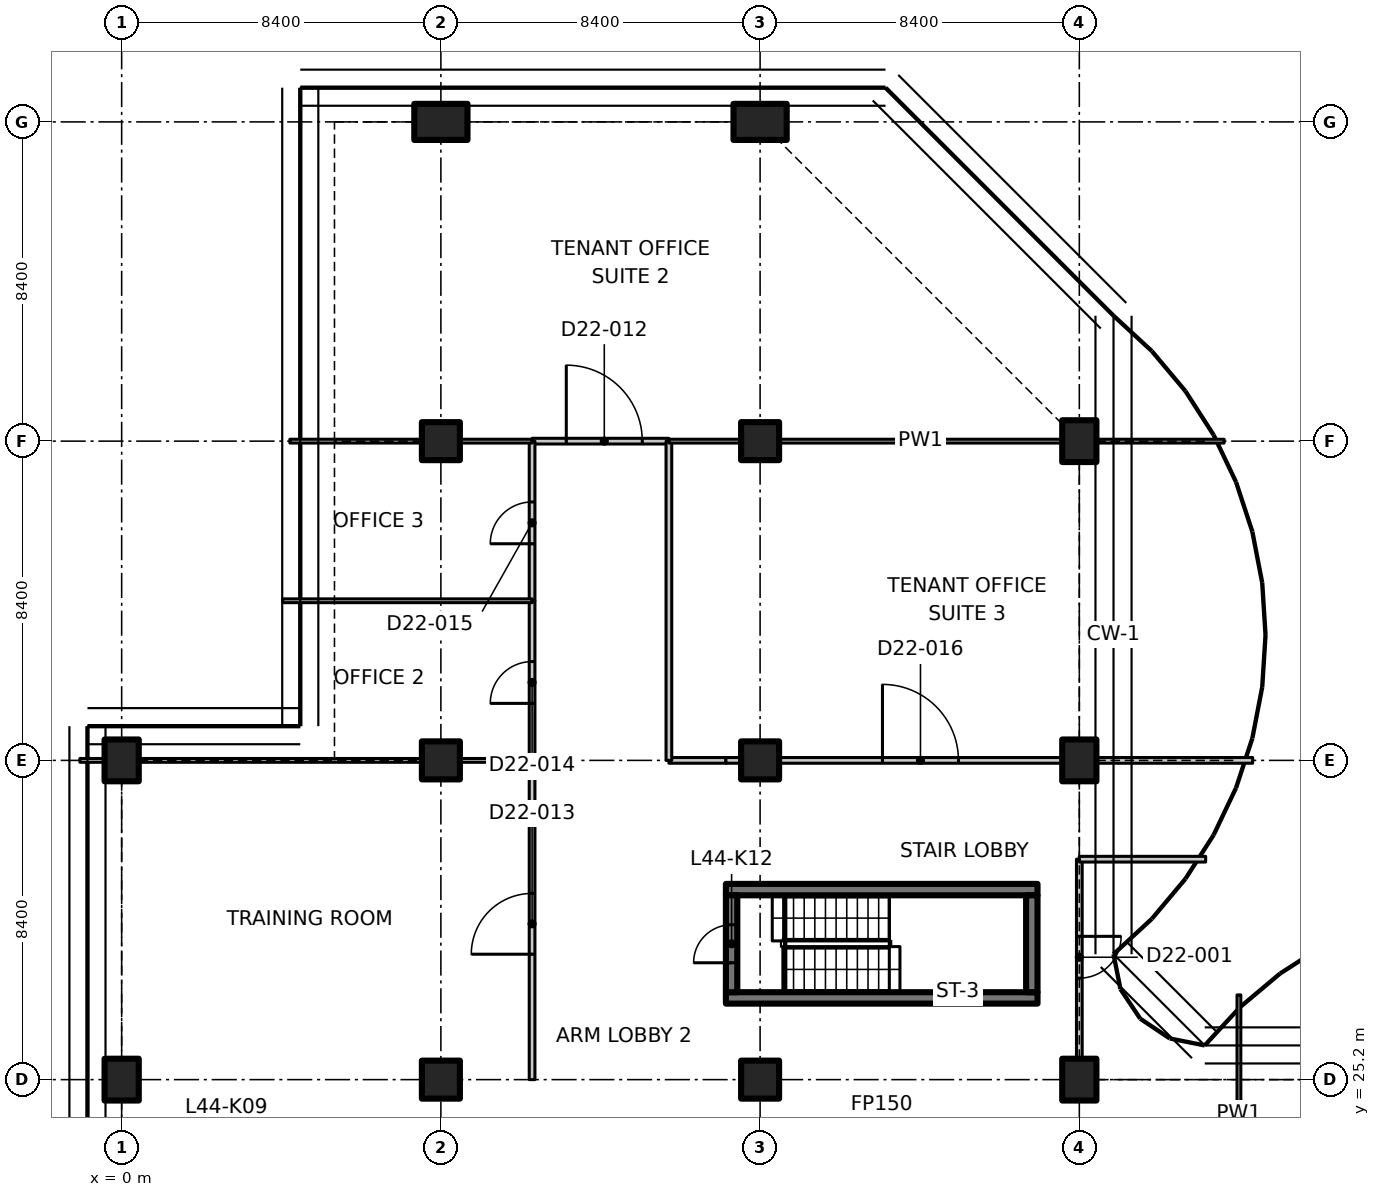
"""IFC4 building model, lengths in metres.
Left out: names, types, materials, properties, quantities, classifications, styles, units other than length and angle.
Written with IfcOpenShell. Run it as: python <this file> out.ifc"""

import sys

from ifc_helpers import new_model, si_unit, direction, frame, frame_2d, origin, origin_2d, place, context, subcontext, project, spatial, polyline, rectangle, outline, extrude, element, fill, save


model = new_model("IFC4")
c1 = context("Model", 3, precision=1e-05, world=origin(), true_north=direction((0.0, 1.0)))
c2 = subcontext(c1, "Body", "Model", "MODEL_VIEW")
j1 = project(units=[si_unit("LENGTHUNIT", "METRE"), si_unit("PLANEANGLEUNIT", "RADIAN")], contexts=[c1])
p1 = place(None, origin())
s1 = spatial("IfcSite", under=j1, at=p1, CompositionType="ELEMENT")
p2 = place(p1, origin())
s2 = spatial("IfcBuilding", under=s1, at=p2, CompositionType="ELEMENT")
p3 = place(p2, frame((0.0, 0.0, 177.6)))
s3 = spatial("IfcBuildingStorey", under=s2, at=p3, CompositionType="ELEMENT", Elevation=177.6)
for number, where, z_axis, x_axis in (
    (1, (0.0, 25.2, 0.0), (0.0, 0.0, 1.0), (1.0, 0.0, 0.0)),
    (2, (0.0, 33.6, 0.0), (0.0, 0.0, 1.0), (1.0, 0.0, 0.0)),
):
    element("IfcColumn", number, at=place(p3, frame(where, z_axis=z_axis, x_axis=x_axis)), inside=s3, PredefinedType="COLUMN", context=c2, shape_type="SweptSolid", body=[
        extrude(rectangle(XDim=0.9, YDim=1.1, at=origin_2d()), origin(), (0.0, 0.0, 1.0), 3.35),
    ])
for number, where, z_axis, x_axis in (
    (3, (8.4, 25.2, 0.0), (0.0, 0.0, 1.0), (1.0, 0.0, 0.0)),
    (4, (8.4, 33.6, 0.0), (0.0, 0.0, 1.0), (1.0, 0.0, 0.0)),
    (5, (8.4, 42.0, 0.0), (0.0, 0.0, 1.0), (1.0, 0.0, 0.0)),
):
    element("IfcColumn", number, at=place(p3, frame(where, z_axis=z_axis, x_axis=x_axis)), inside=s3, PredefinedType="COLUMN", context=c2, shape_type="SweptSolid", body=[
        extrude(rectangle(XDim=1.0, YDim=1.0, at=origin_2d()), origin(), (0.0, 0.0, 1.0), 3.35),
    ])
p4 = place(p3, frame((8.4, 50.4, 0.0), z_axis=(0.0, 0.0, 1.0), x_axis=(0.0, 1.0, 0.0)))
e6 = element("IfcColumn", 6, at=p4, inside=s3, PredefinedType="COLUMN", context=c2, shape_type="SweptSolid", body=[
    extrude(rectangle(XDim=0.95, YDim=1.4, at=origin_2d()), origin(), (0.0, 0.0, 1.0), 3.35),
])
for number, where, z_axis, x_axis in (
    (7, (16.8, 25.2, 0.0), (0.0, 0.0, 1.0), (1.0, 0.0, 0.0)),
    (8, (16.8, 33.6, 0.0), (0.0, 0.0, 1.0), (1.0, 0.0, 0.0)),
    (9, (16.8, 42.0, 0.0), (0.0, 0.0, 1.0), (1.0, 0.0, 0.0)),
):
    element("IfcColumn", number, at=place(p3, frame(where, z_axis=z_axis, x_axis=x_axis)), inside=s3, PredefinedType="COLUMN", context=c2, shape_type="SweptSolid", body=[
        extrude(rectangle(XDim=1.0, YDim=1.0, at=origin_2d()), origin(), (0.0, 0.0, 1.0), 3.35),
    ])
p5 = place(p3, frame((16.8, 50.4, 0.0), z_axis=(0.0, 0.0, 1.0), x_axis=(0.0, 1.0, 0.0)))
e10 = element("IfcColumn", 10, at=p5, inside=s3, PredefinedType="COLUMN", context=c2, shape_type="SweptSolid", body=[
    extrude(rectangle(XDim=0.95, YDim=1.4, at=origin_2d()), origin(), (0.0, 0.0, 1.0), 3.35),
])
for number, where, z_axis, x_axis in (
    (11, (25.2, 25.2, 0.0), (0.0, 0.0, 1.0), (1.0, 0.0, 0.0)),
    (12, (25.2, 33.6, 0.0), (0.0, 0.0, 1.0), (1.0, 0.0, 0.0)),
    (13, (25.2, 42.0, 0.0), (0.0, 0.0, 1.0), (1.0, 0.0, 0.0)),
):
    element("IfcColumn", number, at=place(p3, frame(where, z_axis=z_axis, x_axis=x_axis)), inside=s3, PredefinedType="COLUMN", context=c2, shape_type="SweptSolid", body=[
        extrude(rectangle(XDim=0.9, YDim=1.1, at=origin_2d()), origin(), (0.0, 0.0, 1.0), 3.35),
    ])
for number, where, z_axis, x_axis in (
    (14, (15.9, 27.35, 0.0), (0.0, 0.0, 1.0), (1.0, 0.0, 0.0)),
    (15, (15.9, 30.2, 0.0), (0.0, 0.0, 1.0), (1.0, 0.0, 0.0)),
):
    element("IfcWall", number, at=place(p3, frame(where, z_axis=z_axis, x_axis=x_axis)), inside=s3, PredefinedType="SHEAR", context=c2, shape_type="SweptSolid", body=[
        extrude(rectangle(XDim=8.2, YDim=0.3, at=frame_2d((4.1, 0.0))), origin(), (0.0, 0.0, 1.0), 3.35),
    ])
p6 = place(p3, frame((16.05, 27.5, 0.0), z_axis=(0.0, 0.0, 1.0), x_axis=(0.0, 1.0, 0.0)))
e16 = element("IfcWall", 16, at=p6, inside=s3, PredefinedType="SHEAR", context=c2, shape_type="SweptSolid", body=[
    extrude(rectangle(XDim=2.55, YDim=0.3, at=frame_2d((1.275, 0.0))), origin(), (0.0, 0.0, 1.0), 3.35),
])
p7 = place(p6, frame((0.775, 0.0, 0.0)))
e17 = element("IfcOpeningElement", 17, at=p7, cuts=e16, PredefinedType="OPENING", context=c2, shape_type="SweptSolid", body=[
    extrude(rectangle(XDim=1.0, YDim=2.1, at=frame_2d((0.5, 1.05))), frame((0.0, 0.16, 0.0), z_axis=(0.0, -1.0, 0.0), x_axis=(1.0, 0.0, 0.0)), (0.0, 0.0, 1.0), 0.32),
])
p8 = place(p3, frame((23.95, 27.5, 0.0), z_axis=(0.0, 0.0, 1.0), x_axis=(0.0, 1.0, 0.0)))
e18 = element("IfcWall", 18, at=p8, inside=s3, PredefinedType="SHEAR", context=c2, shape_type="SweptSolid", body=[
    extrude(rectangle(XDim=2.55, YDim=0.3, at=frame_2d((1.275, 0.0))), origin(), (0.0, 0.0, 1.0), 3.35),
])
p9 = place(p3, frame((29.4, 27.429, 0.0), z_axis=(0.0, 0.0, 1.0), x_axis=(0.0, -1.0, 0.0)))
e19 = element("IfcWall", 19, at=p9, inside=s3, PredefinedType="PARTITIONING", context=c2, shape_type="SweptSolid", body=[
    extrude(outline(polyline([(0.0, 0.0), (6.229, 0.0), (6.229, 3.33), (2.679, 3.33), (2.677, 2.98), (1.781, 2.98), (1.779, 3.33), (0.154, 3.33), (0.0, 3.33), (0.0, 0.0)])), frame((0.0, 0.05, 0.0), z_axis=(0.0, -1.0, 0.0), x_axis=(1.0, 0.0, 0.0)), (0.0, 0.0, 1.0), 0.1),
])
p10 = place(p3, frame((25.2, 31.0, 0.0), z_axis=(0.0, 0.0, 1.0), x_axis=(0.0, -1.0, 0.0)))
e20 = element("IfcWall", 20, at=p10, inside=s3, PredefinedType="PARTITIONING", context=c2, shape_type="SweptSolid", body=[
    extrude(outline(polyline([(0.0, 0.0), (5.23, 0.0), (5.23, 2.98), (0.0, 2.98), (0.0, 0.0)])), frame((0.0, 0.075, 0.0), z_axis=(0.0, -1.0, 0.0), x_axis=(1.0, 0.0, 0.0)), (0.0, 0.0, 1.0), 0.15),
])
p11 = place(p10, frame((2.03, 0.0, 0.0)))
e21 = element("IfcOpeningElement", 21, at=p11, cuts=e20, PredefinedType="OPENING", context=c2, shape_type="SweptSolid", body=[
    extrude(rectangle(XDim=1.1, YDim=2.1, at=frame_2d((0.55, 1.05))), frame((0.0, 0.085, 0.0), z_axis=(0.0, -1.0, 0.0), x_axis=(1.0, 0.0, 0.0)), (0.0, 0.0, 1.0), 0.17),
])
p12 = place(p3, frame((25.2, 31.0, 0.0), z_axis=(0.0, 0.0, 1.0), x_axis=(1.0, 0.0, 0.0)))
e22 = element("IfcWall", 22, at=p12, inside=s3, PredefinedType="PARTITIONING", context=c2, shape_type="SweptSolid", body=[
    extrude(rectangle(XDim=3.324, YDim=0.15, at=frame_2d((1.662, 0.0))), origin(), (0.0, 0.0, 1.0), 2.98),
])
p13 = place(p3, frame((10.8, 25.2, 0.0), z_axis=(0.0, 0.0, 1.0), x_axis=(0.0, 1.0, 0.0)))
e23 = element("IfcWall", 23, at=p13, inside=s3, PredefinedType="PARTITIONING", context=c2, shape_type="SweptSolid", body=[
    extrude(rectangle(XDim=8.4, YDim=0.15, at=frame_2d((4.2, 0.0))), origin(), (0.0, 0.0, 1.0), 3.33),
])
p14 = place(p13, frame((3.3, 0.0, 0.0)))
e24 = element("IfcOpeningElement", 24, at=p14, cuts=e23, PredefinedType="OPENING", context=c2, shape_type="SweptSolid", body=[
    extrude(rectangle(XDim=1.6, YDim=2.1, at=frame_2d((0.8, 1.05))), frame((0.0, 0.085, 0.0), z_axis=(0.0, -1.0, 0.0), x_axis=(1.0, 0.0, 0.0)), (0.0, 0.0, 1.0), 0.17),
])
p15 = place(p3, frame((14.4, 33.6, 0.0), z_axis=(0.0, 0.0, 1.0), x_axis=(1.0, 0.0, 0.0)))
e25 = element("IfcWall", 25, at=p15, inside=s3, PredefinedType="PARTITIONING", context=c2, shape_type="SweptSolid", body=[
    extrude(rectangle(XDim=1.5, YDim=0.15, at=frame_2d((0.75, 0.0))), origin(), (0.0, 0.0, 1.0), 3.33),
])
p16 = place(p3, frame((15.9, 33.6, 0.0), z_axis=(0.0, 0.0, 1.0), x_axis=(1.0, 0.0, 0.0)))
e26 = element("IfcWall", 26, at=p16, inside=s3, PredefinedType="PARTITIONING", context=c2, shape_type="SweptSolid", body=[
    extrude(rectangle(XDim=0.38, YDim=0.15, at=frame_2d((0.19, 0.0))), origin(), (0.0, 0.0, 1.0), 3.33),
])
p17 = place(p3, frame((17.32, 33.6, 0.0), z_axis=(0.0, 0.0, 1.0), x_axis=(1.0, 0.0, 0.0)))
e27 = element("IfcWall", 27, at=p17, inside=s3, PredefinedType="PARTITIONING", context=c2, shape_type="SweptSolid", body=[
    extrude(rectangle(XDim=7.41, YDim=0.15, at=frame_2d((3.705, 0.0))), origin(), (0.0, 0.0, 1.0), 3.33),
])
p18 = place(p17, frame((2.7, 0.0, 0.0)))
e28 = element("IfcOpeningElement", 28, at=p18, cuts=e27, PredefinedType="OPENING", context=c2, shape_type="SweptSolid", body=[
    extrude(rectangle(XDim=2.0, YDim=2.4, at=frame_2d((1.0, 1.2))), frame((0.0, 0.085, 0.0), z_axis=(0.0, -1.0, 0.0), x_axis=(1.0, 0.0, 0.0)), (0.0, 0.0, 1.0), 0.17),
])
p19 = place(p3, frame((25.67, 33.6, 0.0), z_axis=(0.0, 0.0, 1.0), x_axis=(1.0, 0.0, 0.0)))
e29 = element("IfcWall", 29, at=p19, inside=s3, PredefinedType="PARTITIONING", context=c2, shape_type="SweptSolid", body=[
    extrude(rectangle(XDim=4.092, YDim=0.15, at=frame_2d((2.046, 0.0))), origin(), (0.0, 0.0, 1.0), 2.98),
])
p20 = place(p3, frame((10.8, 42.0, 0.0), z_axis=(0.0, 0.0, 1.0), x_axis=(1.0, 0.0, 0.0)))
e30 = element("IfcWall", 30, at=p20, inside=s3, PredefinedType="PARTITIONING", context=c2, shape_type="SweptSolid", body=[
    extrude(rectangle(XDim=3.6, YDim=0.15, at=frame_2d((1.8, 0.0))), origin(), (0.0, 0.0, 1.0), 3.33),
])
p21 = place(p20, frame((0.9, 0.0, 0.0)))
e31 = element("IfcOpeningElement", 31, at=p21, cuts=e30, PredefinedType="OPENING", context=c2, shape_type="SweptSolid", body=[
    extrude(rectangle(XDim=2.0, YDim=2.4, at=frame_2d((1.0, 1.2))), frame((0.0, 0.085, 0.0), z_axis=(0.0, -1.0, 0.0), x_axis=(1.0, 0.0, 0.0)), (0.0, 0.0, 1.0), 0.17),
])
p22 = place(p3, frame((10.8, 33.6, 0.0), z_axis=(0.0, 0.0, 1.0), x_axis=(0.0, 1.0, 0.0)))
e32 = element("IfcWall", 32, at=p22, inside=s3, PredefinedType="PARTITIONING", context=c2, shape_type="SweptSolid", body=[
    extrude(rectangle(XDim=4.2, YDim=0.15, at=frame_2d((2.1, 0.0))), origin(), (0.0, 0.0, 1.0), 3.33),
])
p23 = place(p22, frame((1.5, 0.0, 0.0)))
e33 = element("IfcOpeningElement", 33, at=p23, cuts=e32, PredefinedType="OPENING", context=c2, shape_type="SweptSolid", body=[
    extrude(rectangle(XDim=1.1, YDim=2.1, at=frame_2d((0.55, 1.05))), frame((0.0, 0.085, 0.0), z_axis=(0.0, -1.0, 0.0), x_axis=(1.0, 0.0, 0.0)), (0.0, 0.0, 1.0), 0.17),
])
p24 = place(p3, frame((10.8, 37.8, 0.0), z_axis=(0.0, 0.0, 1.0), x_axis=(0.0, 1.0, 0.0)))
e34 = element("IfcWall", 34, at=p24, inside=s3, PredefinedType="PARTITIONING", context=c2, shape_type="SweptSolid", body=[
    extrude(rectangle(XDim=4.2, YDim=0.15, at=frame_2d((2.1, 0.0))), origin(), (0.0, 0.0, 1.0), 3.33),
])
p25 = place(p24, frame((1.5, 0.0, 0.0)))
e35 = element("IfcOpeningElement", 35, at=p25, cuts=e34, PredefinedType="OPENING", context=c2, shape_type="SweptSolid", body=[
    extrude(rectangle(XDim=1.1, YDim=2.1, at=frame_2d((0.55, 1.05))), frame((0.0, 0.085, 0.0), z_axis=(0.0, -1.0, 0.0), x_axis=(1.0, 0.0, 0.0)), (0.0, 0.0, 1.0), 0.17),
])
p26 = place(p3, frame((14.4, 42.0, 0.0), z_axis=(0.0, 0.0, 1.0), x_axis=(0.0, -1.0, 0.0)))
e36 = element("IfcWall", 36, at=p26, inside=s3, PredefinedType="PARTITIONING", context=c2, shape_type="SweptSolid", body=[
    extrude(rectangle(XDim=8.4, YDim=0.15, at=frame_2d((4.2, 0.0))), origin(), (0.0, 0.0, 1.0), 3.33),
])
p27 = place(p3, frame((10.8, 42.0, 0.0), z_axis=(0.0, 0.0, 1.0), x_axis=(-1.0, 0.0, 0.0)))
e37 = element("IfcWall", 37, at=p27, inside=s3, PredefinedType="PARTITIONING", context=c2, shape_type="SweptSolid", body=[
    extrude(rectangle(XDim=1.88, YDim=0.1, at=frame_2d((0.94, 0.0))), origin(), (0.0, 0.0, 1.0), 3.33),
])
p28 = place(p3, frame((7.88, 42.0, 0.0), z_axis=(0.0, 0.0, 1.0), x_axis=(-1.0, 0.0, 0.0)))
e38 = element("IfcWall", 38, at=p28, inside=s3, PredefinedType="PARTITIONING", context=c2, shape_type="SweptSolid", body=[
    extrude(rectangle(XDim=3.454, YDim=0.1, at=frame_2d((1.727, 0.0))), origin(), (0.0, 0.0, 1.0), 2.98),
])
p29 = place(p3, frame((29.011, 42.0, 0.0), z_axis=(0.0, 0.0, 1.0), x_axis=(-1.0, 0.0, 0.0)))
e39 = element("IfcWall", 39, at=p29, inside=s3, PredefinedType="PARTITIONING", context=c2, shape_type="SweptSolid", body=[
    extrude(rectangle(XDim=3.342, YDim=0.1, at=frame_2d((1.671, 0.0))), origin(), (0.0, 0.0, 1.0), 2.98),
])
p30 = place(p3, frame((24.73, 42.0, 0.0), z_axis=(0.0, 0.0, 1.0), x_axis=(-1.0, 0.0, 0.0)))
e40 = element("IfcWall", 40, at=p30, inside=s3, PredefinedType="PARTITIONING", context=c2, shape_type="SweptSolid", body=[
    extrude(outline(polyline([(0.0, 0.0), (7.41, 0.0), (7.41, 3.33), (0.196, 3.33), (0.194, 2.98), (0.0, 2.98), (0.0, 0.0)])), frame((0.0, 0.05, 0.0), z_axis=(0.0, -1.0, 0.0), x_axis=(1.0, 0.0, 0.0)), (0.0, 0.0, 1.0), 0.1),
])
p31 = place(p3, frame((16.28, 42.0, 0.0), z_axis=(0.0, 0.0, 1.0), x_axis=(-1.0, 0.0, 0.0)))
e41 = element("IfcWall", 41, at=p31, inside=s3, PredefinedType="PARTITIONING", context=c2, shape_type="SweptSolid", body=[
    extrude(rectangle(XDim=1.88, YDim=0.1, at=frame_2d((0.94, 0.0))), origin(), (0.0, 0.0, 1.0), 3.33),
])
p32 = place(p3, frame((-1.1, 33.6, 0.0), z_axis=(0.0, 0.0, 1.0), x_axis=(1.0, 0.0, 0.0)))
e42 = element("IfcWall", 42, at=p32, inside=s3, PredefinedType="PARTITIONING", context=c2, shape_type="SweptSolid", body=[
    extrude(rectangle(XDim=0.63, YDim=0.1, at=frame_2d((0.315, 0.0))), origin(), (0.0, 0.0, 1.0), 3.33),
])
p33 = place(p3, frame((0.47, 33.6, 0.0), z_axis=(0.0, 0.0, 1.0), x_axis=(1.0, 0.0, 0.0)))
e43 = element("IfcWall", 43, at=p33, inside=s3, PredefinedType="PARTITIONING", context=c2, shape_type="SweptSolid", body=[
    extrude(outline(polyline([(0.0, 0.0), (7.41, 0.0), (7.41, 2.98), (0.0, 2.98), (0.0, 0.0)])), frame((0.0, 0.05, 0.0), z_axis=(0.0, -1.0, 0.0), x_axis=(1.0, 0.0, 0.0)), (0.0, 0.0, 1.0), 0.1),
])
p34 = place(p3, frame((8.92, 33.6, 0.0), z_axis=(0.0, 0.0, 1.0), x_axis=(1.0, 0.0, 0.0)))
e44 = element("IfcWall", 44, at=p34, inside=s3, PredefinedType="PARTITIONING", context=c2, shape_type="SweptSolid", body=[
    extrude(rectangle(XDim=1.88, YDim=0.1, at=frame_2d((0.94, 0.0))), origin(), (0.0, 0.0, 1.0), 3.33),
])
p35 = place(p3, frame((4.235, 37.8, 0.0), z_axis=(0.0, 0.0, 1.0), x_axis=(1.0, 0.0, 0.0)))
e45 = element("IfcWall", 45, at=p35, inside=s3, PredefinedType="PARTITIONING", context=c2, shape_type="SweptSolid", body=[
    extrude(outline(polyline([(0.0, 0.0), (6.565, 0.0), (6.565, 3.33), (1.815, 3.33), (1.813, 2.98), (0.917, 2.98), (0.915, 3.33), (0.265, 3.33), (0.0, 3.33), (0.0, 0.0)])), frame((0.0, 0.05, 0.0), z_axis=(0.0, -1.0, 0.0), x_axis=(1.0, 0.0, 0.0)), (0.0, 0.0, 1.0), 0.1),
])
p36 = place(p7, origin())
e46 = element("IfcDoor", 46, at=p36, inside=s3, OperationType="SINGLE_SWING_LEFT", PredefinedType="DOOR", context=c2, shape_type="SweptSolid", body=[
    extrude(rectangle(XDim=1.0, YDim=2.1, at=frame_2d((0.5, 1.05))), frame((0.0, 0.025, 0.0), z_axis=(0.0, -1.0, 0.0), x_axis=(1.0, 0.0, 0.0)), (0.0, 0.0, 1.0), 0.05),
])
fill(e17, e46)
p37 = place(p11, origin())
e47 = element("IfcDoor", 47, at=p37, inside=s3, OperationType="SINGLE_SWING_RIGHT", PredefinedType="DOOR", context=c2, shape_type="SweptSolid", body=[
    extrude(rectangle(XDim=1.1, YDim=2.1, at=frame_2d((0.55, 1.05))), frame((0.0, 0.025, 0.0), z_axis=(0.0, -1.0, 0.0), x_axis=(1.0, 0.0, 0.0)), (0.0, 0.0, 1.0), 0.05),
])
fill(e21, e47)
p38 = place(p21, origin())
e48 = element("IfcDoor", 48, at=p38, inside=s3, OperationType="DOUBLE_DOOR_SINGLE_SWING", PredefinedType="DOOR", context=c2, shape_type="SweptSolid", body=[
    extrude(rectangle(XDim=2.0, YDim=2.4, at=frame_2d((1.0, 1.2))), frame((0.0, 0.025, 0.0), z_axis=(0.0, -1.0, 0.0), x_axis=(1.0, 0.0, 0.0)), (0.0, 0.0, 1.0), 0.05),
])
fill(e31, e48)
p39 = place(p14, origin())
e49 = element("IfcDoor", 49, at=p39, inside=s3, OperationType="DOUBLE_DOOR_SINGLE_SWING", PredefinedType="DOOR", context=c2, shape_type="SweptSolid", body=[
    extrude(rectangle(XDim=1.6, YDim=2.1, at=frame_2d((0.8, 1.05))), frame((0.0, 0.025, 0.0), z_axis=(0.0, -1.0, 0.0), x_axis=(1.0, 0.0, 0.0)), (0.0, 0.0, 1.0), 0.05),
])
fill(e24, e49)
p40 = place(p23, origin())
e50 = element("IfcDoor", 50, at=p40, inside=s3, OperationType="SINGLE_SWING_LEFT", PredefinedType="DOOR", context=c2, shape_type="SweptSolid", body=[
    extrude(rectangle(XDim=1.1, YDim=2.1, at=frame_2d((0.55, 1.05))), frame((0.0, 0.025, 0.0), z_axis=(0.0, -1.0, 0.0), x_axis=(1.0, 0.0, 0.0)), (0.0, 0.0, 1.0), 0.05),
])
fill(e33, e50)
p41 = place(p25, origin())
e51 = element("IfcDoor", 51, at=p41, inside=s3, OperationType="SINGLE_SWING_LEFT", PredefinedType="DOOR", context=c2, shape_type="SweptSolid", body=[
    extrude(rectangle(XDim=1.1, YDim=2.1, at=frame_2d((0.55, 1.05))), frame((0.0, 0.025, 0.0), z_axis=(0.0, -1.0, 0.0), x_axis=(1.0, 0.0, 0.0)), (0.0, 0.0, 1.0), 0.05),
])
fill(e35, e51)
p42 = place(p18, origin())
e52 = element("IfcDoor", 52, at=p42, inside=s3, OperationType="DOUBLE_DOOR_SINGLE_SWING", PredefinedType="DOOR", context=c2, shape_type="SweptSolid", body=[
    extrude(rectangle(XDim=2.0, YDim=2.4, at=frame_2d((1.0, 1.2))), frame((0.0, 0.025, 0.0), z_axis=(0.0, -1.0, 0.0), x_axis=(1.0, 0.0, 0.0)), (0.0, 0.0, 1.0), 0.05),
])
fill(e28, e52)
save(model, sys.argv[1])
